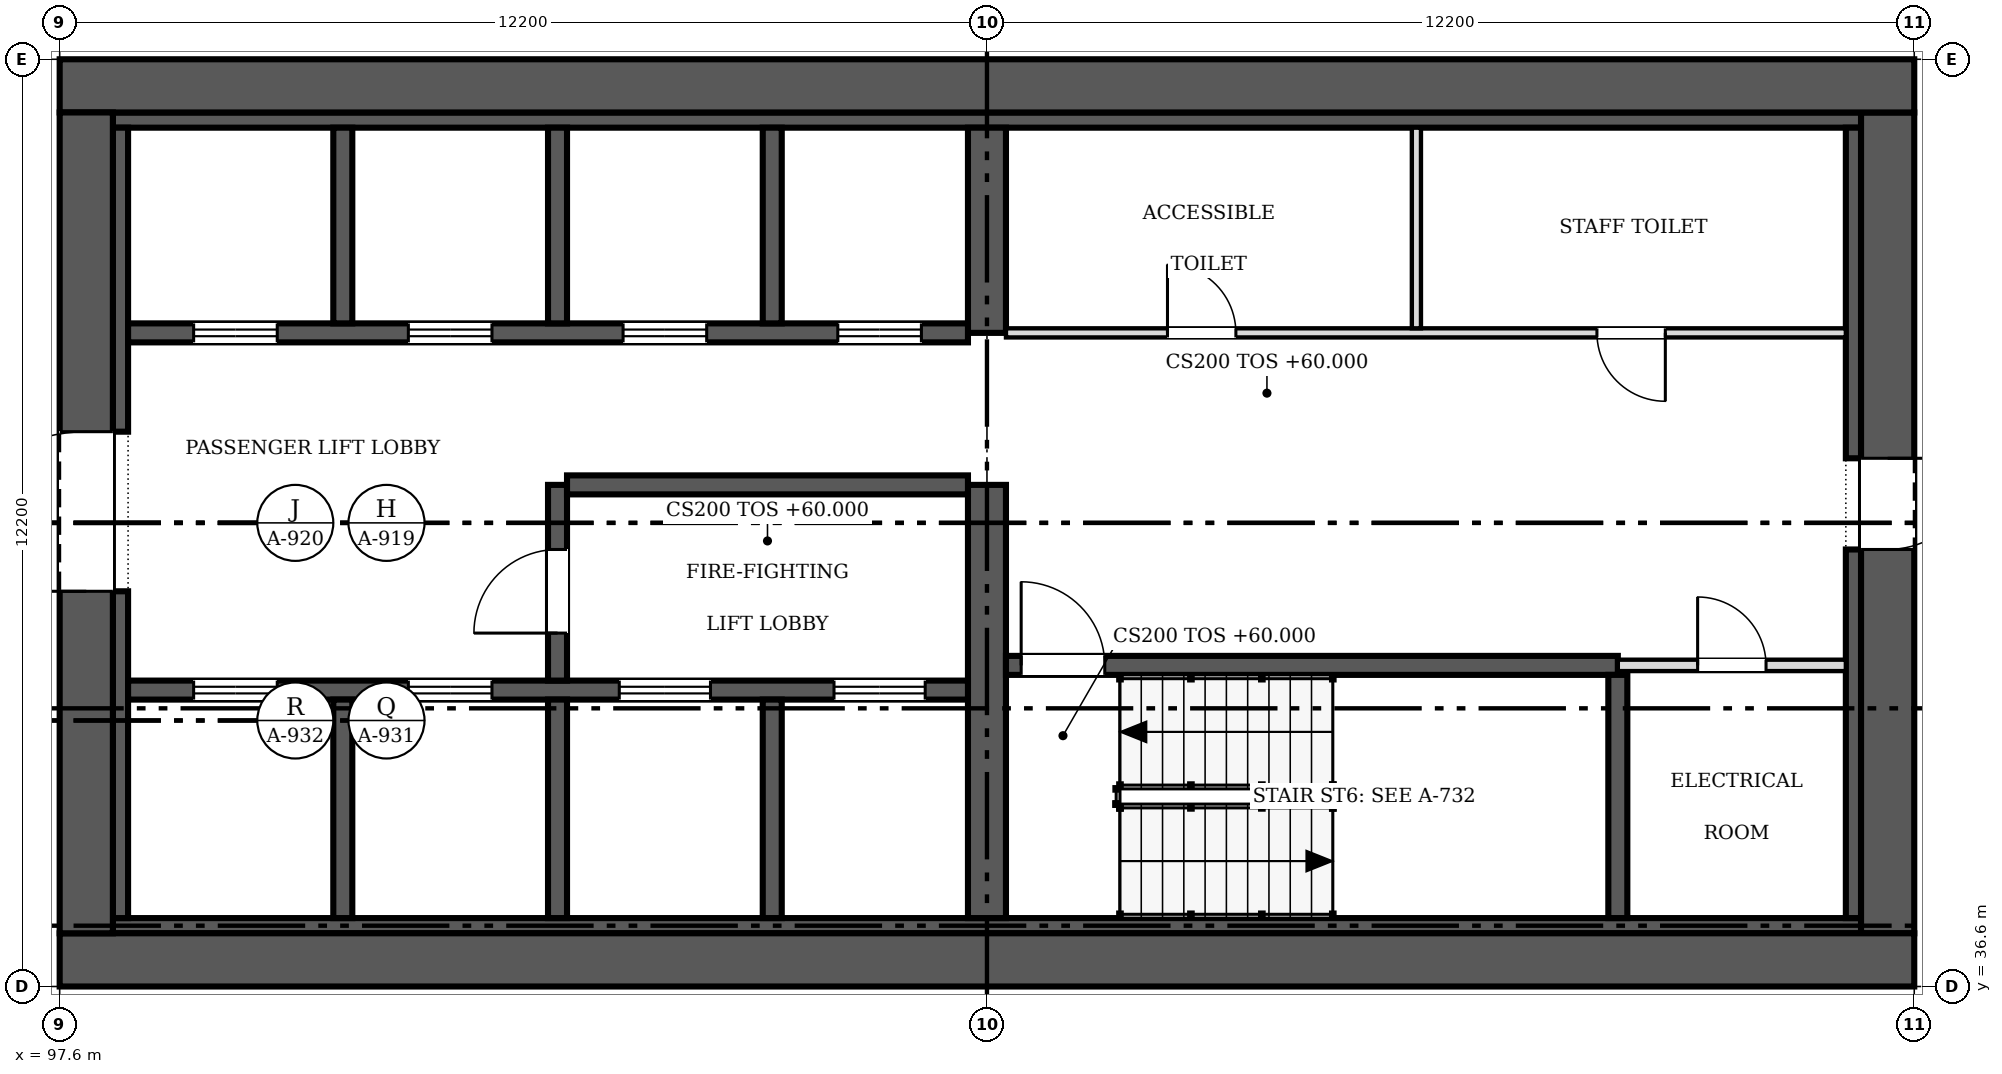
"""IFC4 building model, lengths in metres.
Left out: names, types, materials, properties, quantities, classifications, styles, units other than length and angle.
Written with IfcOpenShell. Run it as: python <this file> out.ifc"""

import sys

from ifc_helpers import new_model, si_unit, direction, frame, frame_2d, origin, place, context, subcontext, project, spatial, rectangle, extrude, source, transform, mapped, element, fill, save


model = new_model("IFC4")
c1 = context("Model", 3, precision=1e-05, world=origin(), true_north=direction((0.0, 1.0)))
c2 = subcontext(c1, "Body", "Model", "MODEL_VIEW")
j1 = project(units=[si_unit("LENGTHUNIT", "METRE"), si_unit("PLANEANGLEUNIT", "RADIAN")], contexts=[c1])
p1 = place(None, origin())
s1 = spatial("IfcSite", under=j1, at=p1, CompositionType="ELEMENT")
p2 = place(p1, origin())
s2 = spatial("IfcBuilding", under=s1, at=p2, CompositionType="ELEMENT")
p3 = place(p2, frame((0.0, 0.0, 60.0)))
s3 = spatial("IfcBuildingStorey", under=s2, at=p3, CompositionType="ELEMENT", Elevation=60.0)
p4 = place(p3, frame((122.0, 36.95, 0.0), z_axis=(0.0, 0.0, 1.0), x_axis=(-1.0, 0.0, 0.0)))
e1 = element("IfcWall", 1, at=p4, inside=s3, PredefinedType="SHEAR", context=c2, shape_type="SweptSolid", body=[
    extrude(rectangle(XDim=24.4, YDim=0.7, at=frame_2d((12.2, 0.0))), origin(), (0.0, 0.0, 1.0), 3.8),
])
p5 = place(p3, frame((97.95, 37.3, 0.0), z_axis=(0.0, 0.0, 1.0), x_axis=(0.0, 1.0, 0.0)))
e2 = element("IfcWall", 2, at=p5, inside=s3, PredefinedType="SHEAR", context=c2, shape_type="SweptSolid", body=[
    extrude(rectangle(XDim=10.8, YDim=0.7, at=frame_2d((5.4, 0.0))), origin(), (0.0, 0.0, 1.0), 3.8),
])
m1 = source(origin(), c2, "Body", "SweptSolid", [
    extrude(rectangle(XDim=2.1, YDim=2.4, at=frame_2d((1.05, 1.2))), frame((0.0, 0.36, 0.0), z_axis=(0.0, -1.0, 0.0), x_axis=(1.0, 0.0, 0.0)), (0.0, 0.0, 1.0), 0.72),
])
p6 = place(p5, frame((4.5, 0.0, 0.0)))
e3 = element("IfcOpeningElement", 3, at=p6, cuts=e2, PredefinedType="OPENING", context=c2, shape_type="MappedRepresentation", body=[
    mapped(m1, transform((0.0, 0.0, 0.0), scale=1.0)),
])
p7 = place(p3, frame((97.6, 48.45, 0.0), z_axis=(0.0, 0.0, 1.0), x_axis=(1.0, 0.0, 0.0)))
e4 = element("IfcWall", 4, at=p7, inside=s3, PredefinedType="SHEAR", context=c2, shape_type="SweptSolid", body=[
    extrude(rectangle(XDim=24.4, YDim=0.7, at=frame_2d((12.2, 0.0))), origin(), (0.0, 0.0, 1.0), 3.8),
])
p8 = place(p3, frame((121.65, 48.1, 0.0), z_axis=(0.0, 0.0, 1.0), x_axis=(0.0, -1.0, 0.0)))
e5 = element("IfcWall", 5, at=p8, inside=s3, PredefinedType="SHEAR", context=c2, shape_type="SweptSolid", body=[
    extrude(rectangle(XDim=10.8, YDim=0.7, at=frame_2d((5.4, 0.0))), origin(), (0.0, 0.0, 1.0), 3.8),
])
m2 = source(origin(), c2, "Body", "SweptSolid", [
    extrude(rectangle(XDim=1.2, YDim=2.1, at=frame_2d((0.6, 1.05))), frame((0.0, 0.36, 0.0), z_axis=(0.0, -1.0, 0.0), x_axis=(1.0, 0.0, 0.0)), (0.0, 0.0, 1.0), 0.72),
])
p9 = place(p8, frame((4.55, 0.0, 0.0)))
e6 = element("IfcOpeningElement", 6, at=p9, cuts=e5, PredefinedType="OPENING", context=c2, shape_type="MappedRepresentation", body=[
    mapped(m2, transform((0.0, 0.0, 0.0), scale=1.0)),
])
for number, where, z_axis, x_axis in (
    (7, (98.3, 37.4, 0.0), (0.0, 0.0, 1.0), (1.0, 0.0, 0.0)),
    (8, (98.3, 48.0, 0.0), (0.0, 0.0, 1.0), (1.0, 0.0, 0.0)),
):
    element("IfcWall", number, at=place(p3, frame(where, z_axis=z_axis, x_axis=x_axis)), inside=s3, PredefinedType="SOLIDWALL", context=c2, shape_type="SweptSolid", body=[
        extrude(rectangle(XDim=23.0, YDim=0.2, at=frame_2d((11.5, 0.0))), origin(), (0.0, 0.0, 1.0), 3.8),
    ])
p10 = place(p3, frame((98.4, 37.5, 0.0), z_axis=(0.0, 0.0, 1.0), x_axis=(0.0, 1.0, 0.0)))
e9 = element("IfcWall", 9, at=p10, inside=s3, PredefinedType="SOLIDWALL", context=c2, shape_type="SweptSolid", body=[
    extrude(rectangle(XDim=4.3, YDim=0.2, at=frame_2d((2.15, 0.0))), origin(), (0.0, 0.0, 1.0), 3.8),
])
p11 = place(p3, frame((98.4, 43.9, 0.0), z_axis=(0.0, 0.0, 1.0), x_axis=(0.0, 1.0, 0.0)))
e10 = element("IfcWall", 10, at=p11, inside=s3, PredefinedType="SOLIDWALL", context=c2, shape_type="SweptSolid", body=[
    extrude(rectangle(XDim=4.0, YDim=0.2, at=frame_2d((2.0, 0.0))), origin(), (0.0, 0.0, 1.0), 3.8),
])
p12 = place(p3, frame((121.2, 37.5, 0.0), z_axis=(0.0, 0.0, 1.0), x_axis=(0.0, 1.0, 0.0)))
e11 = element("IfcWall", 11, at=p12, inside=s3, PredefinedType="SOLIDWALL", context=c2, shape_type="SweptSolid", body=[
    extrude(rectangle(XDim=4.85, YDim=0.2, at=frame_2d((2.425, 0.0))), origin(), (0.0, 0.0, 1.0), 3.8),
])
p13 = place(p3, frame((121.2, 43.55, 0.0), z_axis=(0.0, 0.0, 1.0), x_axis=(0.0, 1.0, 0.0)))
e12 = element("IfcWall", 12, at=p13, inside=s3, PredefinedType="SOLIDWALL", context=c2, shape_type="SweptSolid", body=[
    extrude(rectangle(XDim=4.35, YDim=0.2, at=frame_2d((2.175, 0.0))), origin(), (0.0, 0.0, 1.0), 3.8),
])
p14 = place(p3, frame((109.8, 37.5, 0.0), z_axis=(0.0, 0.0, 1.0), x_axis=(0.0, 1.0, 0.0)))
e13 = element("IfcWall", 13, at=p14, inside=s3, PredefinedType="SHEAR", context=c2, shape_type="SweptSolid", body=[
    extrude(rectangle(XDim=5.7, YDim=0.5, at=frame_2d((2.85, 0.0))), origin(), (0.0, 0.0, 1.0), 3.8),
])
p15 = place(p3, frame((109.8, 45.2, 0.0), z_axis=(0.0, 0.0, 1.0), x_axis=(0.0, 1.0, 0.0)))
e14 = element("IfcWall", 14, at=p15, inside=s3, PredefinedType="SHEAR", context=c2, shape_type="SweptSolid", body=[
    extrude(rectangle(XDim=2.7, YDim=0.5, at=frame_2d((1.35, 0.0))), origin(), (0.0, 0.0, 1.0), 3.8),
])
p16 = place(p3, frame((98.5, 40.5, 0.0), z_axis=(0.0, 0.0, 1.0), x_axis=(1.0, 0.0, 0.0)))
e15 = element("IfcWall", 15, at=p16, inside=s3, PredefinedType="SOLIDWALL", context=c2, shape_type="SweptSolid", body=[
    extrude(rectangle(XDim=11.05, YDim=0.25, at=frame_2d((5.525, 0.0))), origin(), (0.0, 0.0, 1.0), 3.8),
])
m3 = source(origin(), c2, "Body", "SweptSolid", [
    extrude(rectangle(XDim=1.1, YDim=2.1, at=frame_2d((0.55, 1.05))), frame((0.0, 0.135, 0.0), z_axis=(0.0, -1.0, 0.0), x_axis=(1.0, 0.0, 0.0)), (0.0, 0.0, 1.0), 0.27),
])
p17 = place(p16, frame((0.863, 0.0, 0.0)))
e16 = element("IfcOpeningElement", 16, at=p17, cuts=e15, PredefinedType="OPENING", context=c2, shape_type="MappedRepresentation", body=[
    mapped(m3, transform((0.0, 0.0, 0.0), scale=1.0)),
])
p18 = place(p16, frame((3.688, 0.0, 0.0)))
e17 = element("IfcOpeningElement", 17, at=p18, cuts=e15, PredefinedType="OPENING", context=c2, shape_type="MappedRepresentation", body=[
    mapped(m3, transform((0.0, 0.0, 0.0), scale=1.0)),
])
m4 = source(origin(), c2, "Body", "SweptSolid", [
    extrude(rectangle(XDim=1.2, YDim=2.1, at=frame_2d((0.6, 1.05))), frame((0.0, 0.135, 0.0), z_axis=(0.0, -1.0, 0.0), x_axis=(1.0, 0.0, 0.0)), (0.0, 0.0, 1.0), 0.27),
])
p19 = place(p16, frame((6.462, 0.0, 0.0)))
e18 = element("IfcOpeningElement", 18, at=p19, cuts=e15, PredefinedType="OPENING", context=c2, shape_type="MappedRepresentation", body=[
    mapped(m4, transform((0.0, 0.0, 0.0), scale=1.0)),
])
p20 = place(p16, frame((9.288, 0.0, 0.0)))
e19 = element("IfcOpeningElement", 19, at=p20, cuts=e15, PredefinedType="OPENING", context=c2, shape_type="MappedRepresentation", body=[
    mapped(m4, transform((0.0, 0.0, 0.0), scale=1.0)),
])
p21 = place(p3, frame((109.55, 45.2, 0.0), z_axis=(0.0, 0.0, 1.0), x_axis=(-1.0, 0.0, 0.0)))
e20 = element("IfcWall", 20, at=p21, inside=s3, PredefinedType="SOLIDWALL", context=c2, shape_type="SweptSolid", body=[
    extrude(rectangle(XDim=11.05, YDim=0.25, at=frame_2d((5.525, 0.0))), origin(), (0.0, 0.0, 1.0), 3.8),
])
p22 = place(p21, frame((9.087, 0.0, 0.0)))
e21 = element("IfcOpeningElement", 21, at=p22, cuts=e20, PredefinedType="OPENING", context=c2, shape_type="MappedRepresentation", body=[
    mapped(m3, transform((0.0, 0.0, 0.0), scale=1.0)),
])
p23 = place(p21, frame((6.262, 0.0, 0.0)))
e22 = element("IfcOpeningElement", 22, at=p23, cuts=e20, PredefinedType="OPENING", context=c2, shape_type="MappedRepresentation", body=[
    mapped(m3, transform((0.0, 0.0, 0.0), scale=1.0)),
])
p24 = place(p21, frame((3.438, 0.0, 0.0)))
e23 = element("IfcOpeningElement", 23, at=p24, cuts=e20, PredefinedType="OPENING", context=c2, shape_type="MappedRepresentation", body=[
    mapped(m3, transform((0.0, 0.0, 0.0), scale=1.0)),
])
p25 = place(p21, frame((0.613, 0.0, 0.0)))
e24 = element("IfcOpeningElement", 24, at=p25, cuts=e20, PredefinedType="OPENING", context=c2, shape_type="MappedRepresentation", body=[
    mapped(m3, transform((0.0, 0.0, 0.0), scale=1.0)),
])
p26 = place(p3, frame((118.1, 40.825, 0.0), z_axis=(0.0, 0.0, 1.0), x_axis=(-1.0, 0.0, 0.0)))
e25 = element("IfcWall", 25, at=p26, inside=s3, PredefinedType="SOLIDWALL", context=c2, shape_type="SweptSolid", body=[
    extrude(rectangle(XDim=8.05, YDim=0.25, at=frame_2d((4.025, 0.0))), origin(), (0.0, 0.0, 1.0), 3.8),
])
p27 = place(p26, frame((6.75, 0.0, 0.0)))
e26 = element("IfcOpeningElement", 26, at=p27, cuts=e25, PredefinedType="OPENING", context=c2, shape_type="MappedRepresentation", body=[
    mapped(m3, transform((0.0, 0.0, 0.0), scale=1.0)),
])
p28 = place(p3, frame((104.15, 37.5, 0.0), z_axis=(0.0, 0.0, 1.0), x_axis=(0.0, 1.0, 0.0)))
e27 = element("IfcWall", 27, at=p28, inside=s3, PredefinedType="SOLIDWALL", context=c2, shape_type="SweptSolid", body=[
    extrude(rectangle(XDim=2.875, YDim=0.25, at=frame_2d((1.438, 0.0))), origin(), (0.0, 0.0, 1.0), 3.8),
])
p29 = place(p3, frame((104.15, 43.2, 0.0), z_axis=(0.0, 0.0, 1.0), x_axis=(0.0, -1.0, 0.0)))
e28 = element("IfcWall", 28, at=p29, inside=s3, PredefinedType="SOLIDWALL", context=c2, shape_type="SweptSolid", body=[
    extrude(rectangle(XDim=2.575, YDim=0.25, at=frame_2d((1.288, 0.0))), origin(), (0.0, 0.0, 1.0), 3.8),
])
p30 = place(p29, frame((0.85, 0.0, 0.0)))
e29 = element("IfcOpeningElement", 29, at=p30, cuts=e28, PredefinedType="OPENING", context=c2, shape_type="MappedRepresentation", body=[
    mapped(m3, transform((0.0, 0.0, 0.0), scale=1.0)),
])
p31 = place(p3, frame((104.275, 43.2, 0.0), z_axis=(0.0, 0.0, 1.0), x_axis=(1.0, 0.0, 0.0)))
e30 = element("IfcWall", 30, at=p31, inside=s3, PredefinedType="SOLIDWALL", context=c2, shape_type="SweptSolid", body=[
    extrude(rectangle(XDim=5.275, YDim=0.25, at=frame_2d((2.638, 0.0))), origin(), (0.0, 0.0, 1.0), 3.8),
])
p32 = place(p3, frame((118.1, 37.5, 0.0), z_axis=(0.0, 0.0, 1.0), x_axis=(0.0, 1.0, 0.0)))
e31 = element("IfcWall", 31, at=p32, inside=s3, PredefinedType="SOLIDWALL", context=c2, shape_type="SweptSolid", body=[
    extrude(rectangle(XDim=3.2, YDim=0.25, at=frame_2d((1.6, 0.0))), origin(), (0.0, 0.0, 1.0), 3.8),
])
for number, where, z_axis, x_axis in (
    (32, (101.325, 37.5, 0.0), (0.0, 0.0, 1.0), (0.0, 1.0, 0.0)),
    (33, (106.975, 37.5, 0.0), (0.0, 0.0, 1.0), (0.0, 1.0, 0.0)),
):
    element("IfcWall", number, at=place(p3, frame(where, z_axis=z_axis, x_axis=x_axis)), inside=s3, PredefinedType="SOLIDWALL", context=c2, shape_type="SweptSolid", body=[
        extrude(rectangle(XDim=2.875, YDim=0.25, at=frame_2d((1.438, 0.0))), origin(), (0.0, 0.0, 1.0), 3.8),
    ])
for number, where, z_axis, x_axis in (
    (34, (101.325, 45.325, 0.0), (0.0, 0.0, 1.0), (0.0, 1.0, 0.0)),
    (35, (104.15, 45.325, 0.0), (0.0, 0.0, 1.0), (0.0, 1.0, 0.0)),
    (36, (106.975, 45.325, 0.0), (0.0, 0.0, 1.0), (0.0, 1.0, 0.0)),
):
    element("IfcWall", number, at=place(p3, frame(where, z_axis=z_axis, x_axis=x_axis)), inside=s3, PredefinedType="SOLIDWALL", context=c2, shape_type="SweptSolid", body=[
        extrude(rectangle(XDim=2.575, YDim=0.25, at=frame_2d((1.288, 0.0))), origin(), (0.0, 0.0, 1.0), 3.8),
    ])
p33 = place(p3, frame((110.05, 45.2, 0.0), z_axis=(0.0, 0.0, 1.0), x_axis=(1.0, 0.0, 0.0)))
e37 = element("IfcWall", 37, at=p33, inside=s3, PredefinedType="PARTITIONING", context=c2, shape_type="SweptSolid", body=[
    extrude(rectangle(XDim=11.05, YDim=0.12, at=frame_2d((5.525, 0.0))), origin(), (0.0, 0.0, 1.0), 3.5),
])
m5 = source(origin(), c2, "Body", "SweptSolid", [
    extrude(rectangle(XDim=0.9, YDim=2.1, at=frame_2d((0.45, 1.05))), frame((0.0, 0.07, 0.0), z_axis=(0.0, -1.0, 0.0), x_axis=(1.0, 0.0, 0.0)), (0.0, 0.0, 1.0), 0.14),
])
p34 = place(p33, frame((2.125, 0.0, 0.0)))
e38 = element("IfcOpeningElement", 38, at=p34, cuts=e37, PredefinedType="OPENING", context=c2, shape_type="MappedRepresentation", body=[
    mapped(m5, transform((0.0, 0.0, 0.0), scale=1.0)),
])
p35 = place(p33, frame((7.775, 0.0, 0.0)))
e39 = element("IfcOpeningElement", 39, at=p35, cuts=e37, PredefinedType="OPENING", context=c2, shape_type="MappedRepresentation", body=[
    mapped(m5, transform((0.0, 0.0, 0.0), scale=1.0)),
])
p36 = place(p3, frame((121.1, 40.825, 0.0), z_axis=(0.0, 0.0, 1.0), x_axis=(-1.0, 0.0, 0.0)))
e40 = element("IfcWall", 40, at=p36, inside=s3, PredefinedType="PARTITIONING", context=c2, shape_type="SweptSolid", body=[
    extrude(rectangle(XDim=3.0, YDim=0.15, at=frame_2d((1.5, 0.0))), origin(), (0.0, 0.0, 1.0), 3.5),
])
m6 = source(origin(), c2, "Body", "SweptSolid", [
    extrude(rectangle(XDim=0.9, YDim=2.1, at=frame_2d((0.45, 1.05))), frame((0.0, 0.085, 0.0), z_axis=(0.0, -1.0, 0.0), x_axis=(1.0, 0.0, 0.0)), (0.0, 0.0, 1.0), 0.17),
])
p37 = place(p36, frame((1.05, 0.0, 0.0)))
e41 = element("IfcOpeningElement", 41, at=p37, cuts=e40, PredefinedType="OPENING", context=c2, shape_type="MappedRepresentation", body=[
    mapped(m6, transform((0.0, 0.0, 0.0), scale=1.0)),
])
p38 = place(p3, frame((115.45, 45.26, 0.0), z_axis=(0.0, 0.0, 1.0), x_axis=(0.0, 1.0, 0.0)))
e42 = element("IfcWall", 42, at=p38, inside=s3, PredefinedType="PARTITIONING", context=c2, shape_type="SweptSolid", body=[
    extrude(rectangle(XDim=2.64, YDim=0.12, at=frame_2d((1.32, 0.0))), origin(), (0.0, 0.0, 1.0), 3.5),
])
m7 = source(origin(), c2, "Body", "SweptSolid", [
    extrude(rectangle(XDim=2.1, YDim=2.4, at=frame_2d((1.05, 1.2))), frame((0.0, 0.025, 0.0), z_axis=(0.0, -1.0, 0.0), x_axis=(1.0, 0.0, 0.0)), (0.0, 0.0, 1.0), 0.05),
])
p39 = place(p6, origin())
e43 = element("IfcDoor", 43, at=p39, inside=s3, OperationType="DOUBLE_DOOR_SINGLE_SWING", PredefinedType="DOOR", context=c2, shape_type="MappedRepresentation", body=[
    mapped(m7, transform((0.0, 0.0, 0.0), scale=1.0)),
])
fill(e3, e43)
m8 = source(origin(), c2, "Body", "SweptSolid", [
    extrude(rectangle(XDim=1.2, YDim=2.1, at=frame_2d((0.6, 1.05))), frame((0.0, 0.025, 0.0), z_axis=(0.0, -1.0, 0.0), x_axis=(1.0, 0.0, 0.0)), (0.0, 0.0, 1.0), 0.05),
])
p40 = place(p9, origin())
e44 = element("IfcDoor", 44, at=p40, inside=s3, OperationType="SINGLE_SWING_LEFT", PredefinedType="DOOR", context=c2, shape_type="MappedRepresentation", body=[
    mapped(m8, transform((0.0, 0.0, 0.0), scale=1.0)),
])
fill(e6, e44)
m9 = source(origin(), c2, "Body", "SweptSolid", [
    extrude(rectangle(XDim=1.1, YDim=2.1, at=frame_2d((0.55, 1.05))), frame((0.0, 0.025, 0.0), z_axis=(0.0, -1.0, 0.0), x_axis=(1.0, 0.0, 0.0)), (0.0, 0.0, 1.0), 0.05),
])
p41 = place(p17, origin())
e45 = element("IfcDoor", 45, at=p41, inside=s3, OperationType="DOUBLE_DOOR_SLIDING", PredefinedType="DOOR", context=c2, shape_type="MappedRepresentation", body=[
    mapped(m9, transform((0.0, 0.0, 0.0), scale=1.0)),
])
fill(e16, e45)
p42 = place(p18, origin())
e46 = element("IfcDoor", 46, at=p42, inside=s3, OperationType="DOUBLE_DOOR_SLIDING", PredefinedType="DOOR", context=c2, shape_type="MappedRepresentation", body=[
    mapped(m9, transform((0.0, 0.0, 0.0), scale=1.0)),
])
fill(e17, e46)
p43 = place(p19, origin())
e47 = element("IfcDoor", 47, at=p43, inside=s3, OperationType="DOUBLE_DOOR_SLIDING", PredefinedType="DOOR", context=c2, shape_type="MappedRepresentation", body=[
    mapped(m8, transform((0.0, 0.0, 0.0), scale=1.0)),
])
fill(e18, e47)
p44 = place(p20, origin())
e48 = element("IfcDoor", 48, at=p44, inside=s3, OperationType="DOUBLE_DOOR_SLIDING", PredefinedType="DOOR", context=c2, shape_type="MappedRepresentation", body=[
    mapped(m8, transform((0.0, 0.0, 0.0), scale=1.0)),
])
fill(e19, e48)
p45 = place(p22, origin())
e49 = element("IfcDoor", 49, at=p45, inside=s3, OperationType="DOUBLE_DOOR_SLIDING", PredefinedType="DOOR", context=c2, shape_type="MappedRepresentation", body=[
    mapped(m9, transform((0.0, 0.0, 0.0), scale=1.0)),
])
fill(e21, e49)
p46 = place(p23, origin())
e50 = element("IfcDoor", 50, at=p46, inside=s3, OperationType="DOUBLE_DOOR_SLIDING", PredefinedType="DOOR", context=c2, shape_type="MappedRepresentation", body=[
    mapped(m9, transform((0.0, 0.0, 0.0), scale=1.0)),
])
fill(e22, e50)
p47 = place(p24, origin())
e51 = element("IfcDoor", 51, at=p47, inside=s3, OperationType="DOUBLE_DOOR_SLIDING", PredefinedType="DOOR", context=c2, shape_type="MappedRepresentation", body=[
    mapped(m9, transform((0.0, 0.0, 0.0), scale=1.0)),
])
fill(e23, e51)
p48 = place(p25, origin())
e52 = element("IfcDoor", 52, at=p48, inside=s3, OperationType="DOUBLE_DOOR_SLIDING", PredefinedType="DOOR", context=c2, shape_type="MappedRepresentation", body=[
    mapped(m9, transform((0.0, 0.0, 0.0), scale=1.0)),
])
fill(e24, e52)
p49 = place(p27, origin())
e53 = element("IfcDoor", 53, at=p49, inside=s3, OperationType="SINGLE_SWING_RIGHT", PredefinedType="DOOR", context=c2, shape_type="MappedRepresentation", body=[
    mapped(m9, transform((0.0, 0.0, 0.0), scale=1.0)),
])
fill(e26, e53)
p50 = place(p30, origin())
e54 = element("IfcDoor", 54, at=p50, inside=s3, OperationType="SINGLE_SWING_RIGHT", PredefinedType="DOOR", context=c2, shape_type="MappedRepresentation", body=[
    mapped(m9, transform((0.0, 0.0, 0.0), scale=1.0)),
])
fill(e29, e54)
m10 = source(origin(), c2, "Body", "SweptSolid", [
    extrude(rectangle(XDim=0.9, YDim=2.1, at=frame_2d((0.45, 1.05))), frame((0.0, 0.025, 0.0), z_axis=(0.0, -1.0, 0.0), x_axis=(1.0, 0.0, 0.0)), (0.0, 0.0, 1.0), 0.05),
])
p51 = place(p34, origin())
e55 = element("IfcDoor", 55, at=p51, inside=s3, OperationType="SINGLE_SWING_LEFT", PredefinedType="DOOR", context=c2, shape_type="MappedRepresentation", body=[
    mapped(m10, transform((0.0, 0.0, 0.0), scale=1.0)),
])
fill(e38, e55)
p52 = place(p35, origin())
e56 = element("IfcDoor", 56, at=p52, inside=s3, OperationType="SINGLE_SWING_RIGHT", PredefinedType="DOOR", context=c2, shape_type="MappedRepresentation", body=[
    mapped(m10, transform((0.0, 0.0, 0.0), scale=1.0)),
])
fill(e39, e56)
p53 = place(p37, origin())
e57 = element("IfcDoor", 57, at=p53, inside=s3, OperationType="SINGLE_SWING_RIGHT", PredefinedType="DOOR", context=c2, shape_type="MappedRepresentation", body=[
    mapped(m10, transform((0.0, 0.0, 0.0), scale=1.0)),
])
fill(e41, e57)
save(model, sys.argv[1])
